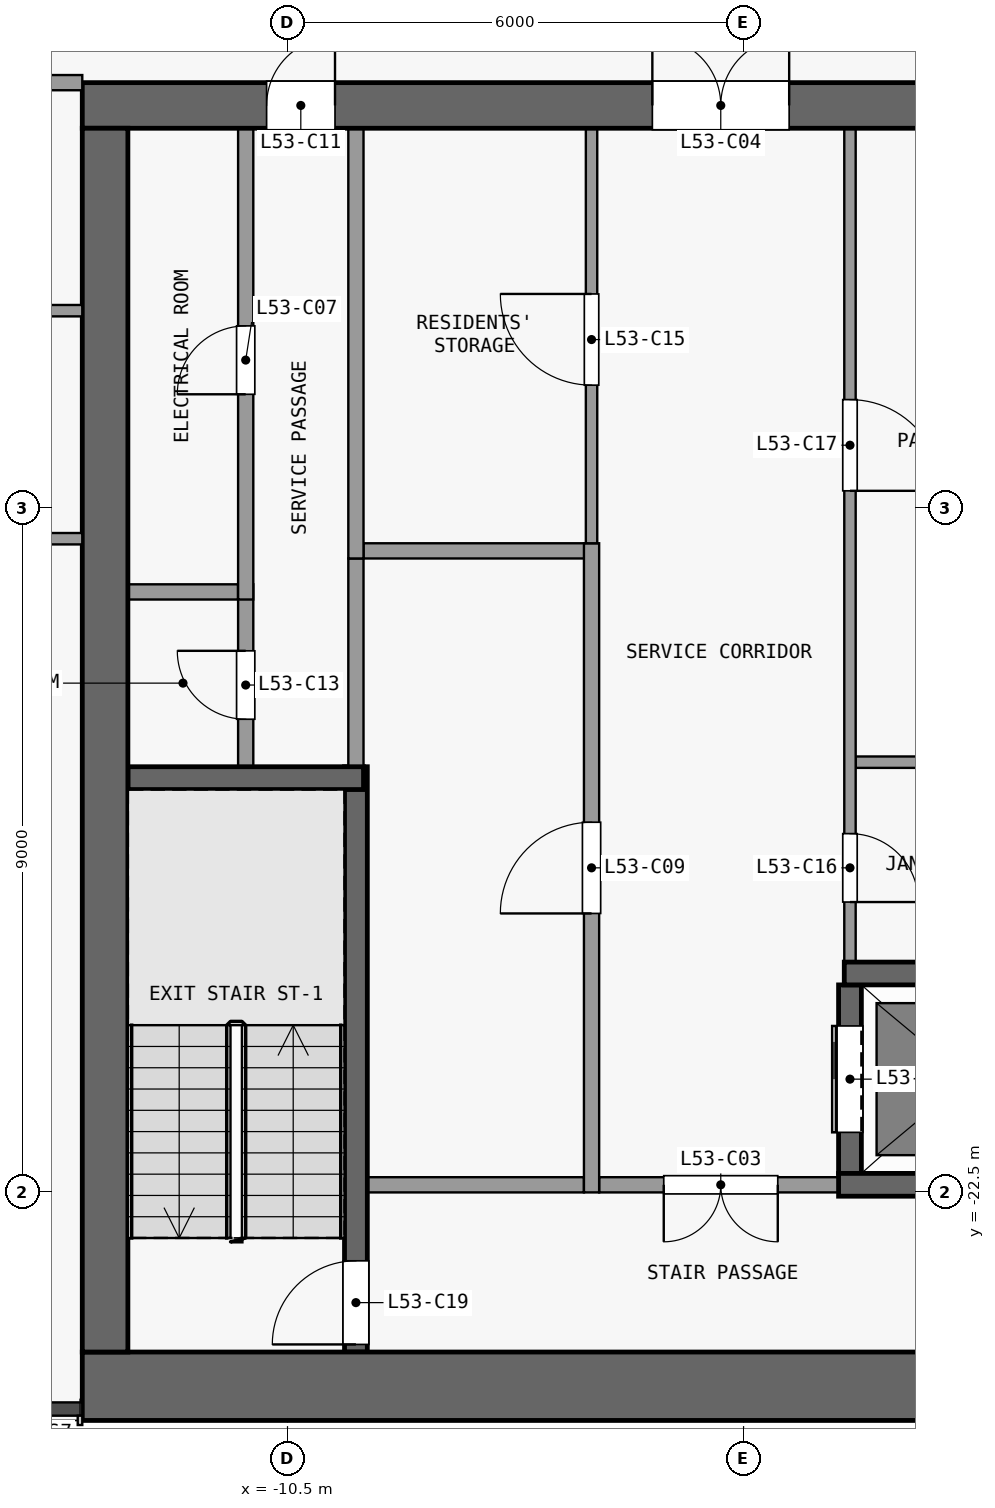
"""IFC4 building model, lengths in metres.
Left out: names, types, materials, properties, quantities, classifications, styles, units other than length and angle.
Written with IfcOpenShell. Run it as: python <this file> out.ifc"""

import sys

from ifc_helpers import new_model, si_unit, direction, frame, frame_2d, origin, place, context, subcontext, project, spatial, rectangle, extrude, element, fill, save


model = new_model("IFC4")
c1 = context("Model", 3, precision=1e-05, world=origin(), true_north=direction((0.0, 1.0)))
c2 = subcontext(c1, "Body", "Model", "MODEL_VIEW")
j1 = project(units=[si_unit("LENGTHUNIT", "METRE"), si_unit("PLANEANGLEUNIT", "RADIAN")], contexts=[c1])
p1 = place(None, origin())
s1 = spatial("IfcSite", under=j1, at=p1, CompositionType="ELEMENT")
p2 = place(p1, origin())
s2 = spatial("IfcBuilding", under=s1, at=p2, CompositionType="ELEMENT")
p3 = place(p2, frame((0.0, 0.0, 212.3)))
s3 = spatial("IfcBuildingStorey", under=s2, at=p3, CompositionType="ELEMENT", Elevation=212.3)
p4 = place(p3, frame((-13.2, -25.05, 0.0), z_axis=(0.0, 0.0, 1.0), x_axis=(1.0, 0.0, 0.0)))
e1 = element("IfcWall", 1, at=p4, inside=s3, PredefinedType="SHEAR", context=c2, shape_type="SweptSolid", body=[
    extrude(rectangle(XDim=26.4, YDim=0.9, at=frame_2d((13.2, 0.0))), origin(), (0.0, 0.0, 1.0), 3.3),
])
p5 = place(p3, frame((-13.2, -8.2, 0.0), z_axis=(0.0, 0.0, 1.0), x_axis=(1.0, 0.0, 0.0)))
e2 = element("IfcWall", 2, at=p5, inside=s3, PredefinedType="SHEAR", context=c2, shape_type="SweptSolid", body=[
    extrude(rectangle(XDim=26.4, YDim=0.6, at=frame_2d((13.2, 0.0))), origin(), (0.0, 0.0, 1.0), 3.3),
])
p6 = place(p5, frame((7.5, 0.0, 0.0)))
e3 = element("IfcOpeningElement", 3, at=p6, cuts=e2, PredefinedType="OPENING", context=c2, shape_type="SweptSolid", body=[
    extrude(rectangle(XDim=1.8, YDim=2.1, at=frame_2d((0.9, 1.05))), frame((0.0, 0.31, 0.0), z_axis=(0.0, -1.0, 0.0), x_axis=(1.0, 0.0, 0.0)), (0.0, 0.0, 1.0), 0.62),
])
p7 = place(p5, frame((17.1, 0.0, 0.0)))
e4 = element("IfcOpeningElement", 4, at=p7, cuts=e2, PredefinedType="OPENING", context=c2, shape_type="SweptSolid", body=[
    extrude(rectangle(XDim=1.8, YDim=2.1, at=frame_2d((0.9, 1.05))), frame((0.0, 0.31, 0.0), z_axis=(0.0, -1.0, 0.0), x_axis=(1.0, 0.0, 0.0)), (0.0, 0.0, 1.0), 0.62),
])
p8 = place(p5, frame((2.425, 0.0, 0.0)))
e5 = element("IfcOpeningElement", 5, at=p8, cuts=e2, PredefinedType="OPENING", context=c2, shape_type="SweptSolid", body=[
    extrude(rectangle(XDim=0.9, YDim=2.1, at=frame_2d((0.45, 1.05))), frame((0.0, 0.31, 0.0), z_axis=(0.0, -1.0, 0.0), x_axis=(1.0, 0.0, 0.0)), (0.0, 0.0, 1.0), 0.62),
])
p9 = place(p5, frame((23.075, 0.0, 0.0)))
e6 = element("IfcOpeningElement", 6, at=p9, cuts=e2, PredefinedType="OPENING", context=c2, shape_type="SweptSolid", body=[
    extrude(rectangle(XDim=0.9, YDim=2.1, at=frame_2d((0.45, 1.05))), frame((0.0, 0.31, 0.0), z_axis=(0.0, -1.0, 0.0), x_axis=(1.0, 0.0, 0.0)), (0.0, 0.0, 1.0), 0.62),
])
p10 = place(p3, frame((-12.9, -24.6, 0.0), z_axis=(0.0, 0.0, 1.0), x_axis=(0.0, 1.0, 0.0)))
e7 = element("IfcWall", 7, at=p10, inside=s3, PredefinedType="SHEAR", context=c2, shape_type="SweptSolid", body=[
    extrude(rectangle(XDim=16.1, YDim=0.6, at=frame_2d((8.05, 0.0))), origin(), (0.0, 0.0, 1.0), 3.3),
])
p11 = place(p3, frame((-9.45, -22.4, 0.0), z_axis=(0.0, 0.0, 1.0), x_axis=(1.0, 0.0, 0.0)))
e8 = element("IfcWall", 8, at=p11, inside=s3, PredefinedType="PARTITIONING", context=c2, shape_type="SweptSolid", body=[
    extrude(rectangle(XDim=2.85, YDim=0.2, at=frame_2d((1.425, 0.0))), origin(), (0.0, 0.0, 1.0), 3.3),
])
p12 = place(p3, frame((-3.25, -22.4, 0.0), z_axis=(0.0, 0.0, 1.0), x_axis=(-1.0, 0.0, 0.0)))
e9 = element("IfcWall", 9, at=p12, inside=s3, PredefinedType="PARTITIONING", context=c2, shape_type="SweptSolid", body=[
    extrude(rectangle(XDim=3.15, YDim=0.2, at=frame_2d((1.575, 0.0))), origin(), (0.0, 0.0, 1.0), 3.3),
])
p13 = place(p12, frame((0.8, 0.0, 0.0)))
e10 = element("IfcOpeningElement", 10, at=p13, cuts=e9, PredefinedType="OPENING", context=c2, shape_type="SweptSolid", body=[
    extrude(rectangle(XDim=1.5, YDim=2.1, at=frame_2d((0.75, 1.05))), frame((0.0, 0.11, 0.0), z_axis=(0.0, -1.0, 0.0), x_axis=(1.0, 0.0, 0.0)), (0.0, 0.0, 1.0), 0.22),
])
p14 = place(p3, frame((-3.25, -22.4, 0.0), z_axis=(0.0, 0.0, 1.0), x_axis=(1.0, 0.0, 0.0)))
e11 = element("IfcWall", 11, at=p14, inside=s3, PredefinedType="SHEAR", context=c2, shape_type="SweptSolid", body=[
    extrude(rectangle(XDim=6.5, YDim=0.3, at=frame_2d((3.25, 0.0))), origin(), (0.0, 0.0, 1.0), 3.3),
])
p15 = place(p3, frame((-3.175, -19.62, 0.0), z_axis=(0.0, 0.0, 1.0), x_axis=(1.0, 0.0, 0.0)))
e12 = element("IfcWall", 12, at=p15, inside=s3, PredefinedType="SHEAR", context=c2, shape_type="SweptSolid", body=[
    extrude(rectangle(XDim=3.025, YDim=0.3, at=frame_2d((1.513, 0.0))), origin(), (0.0, 0.0, 1.0), 3.3),
])
p16 = place(p3, frame((-12.6, -17.05, 0.0), z_axis=(0.0, 0.0, 1.0), x_axis=(1.0, 0.0, 0.0)))
e13 = element("IfcWall", 13, at=p16, inside=s3, PredefinedType="SHEAR", context=c2, shape_type="SweptSolid", body=[
    extrude(rectangle(XDim=3.1, YDim=0.3, at=frame_2d((1.55, 0.0))), origin(), (0.0, 0.0, 1.0), 3.3),
])
p17 = place(p3, frame((-3.025, -16.84, 0.0), z_axis=(0.0, 0.0, 1.0), x_axis=(1.0, 0.0, 0.0)))
e14 = element("IfcWall", 14, at=p17, inside=s3, PredefinedType="PARTITIONING", context=c2, shape_type="SweptSolid", body=[
    extrude(rectangle(XDim=2.925, YDim=0.15, at=frame_2d((1.462, 0.0))), origin(), (0.0, 0.0, 1.0), 3.3),
])
p18 = place(p3, frame((-12.6, -14.6, 0.0), z_axis=(0.0, 0.0, 1.0), x_axis=(1.0, 0.0, 0.0)))
e15 = element("IfcWall", 15, at=p18, inside=s3, PredefinedType="PARTITIONING", context=c2, shape_type="SweptSolid", body=[
    extrude(rectangle(XDim=1.45, YDim=0.2, at=frame_2d((0.725, 0.0))), origin(), (0.0, 0.0, 1.0), 3.3),
])
p19 = place(p3, frame((-9.5, -14.06, 0.0), z_axis=(0.0, 0.0, 1.0), x_axis=(1.0, 0.0, 0.0)))
e16 = element("IfcWall", 16, at=p19, inside=s3, PredefinedType="PARTITIONING", context=c2, shape_type="SweptSolid", body=[
    extrude(rectangle(XDim=3.075, YDim=0.2, at=frame_2d((1.538, 0.0))), origin(), (0.0, 0.0, 1.0), 3.3),
])
p20 = place(p3, frame((-11.05, -16.9, 0.0), z_axis=(0.0, 0.0, 1.0), x_axis=(0.0, 1.0, 0.0)))
e17 = element("IfcWall", 17, at=p20, inside=s3, PredefinedType="PARTITIONING", context=c2, shape_type="SweptSolid", body=[
    extrude(rectangle(XDim=2.4, YDim=0.2, at=frame_2d((1.2, 0.0))), origin(), (0.0, 0.0, 1.0), 3.3),
])
p21 = place(p20, frame((0.625, 0.0, 0.0)))
e18 = element("IfcOpeningElement", 18, at=p21, cuts=e17, PredefinedType="OPENING", context=c2, shape_type="SweptSolid", body=[
    extrude(rectangle(XDim=0.9, YDim=2.1, at=frame_2d((0.45, 1.05))), frame((0.0, 0.11, 0.0), z_axis=(0.0, -1.0, 0.0), x_axis=(1.0, 0.0, 0.0)), (0.0, 0.0, 1.0), 0.22),
])
p22 = place(p3, frame((-11.05, -14.7, 0.0), z_axis=(0.0, 0.0, 1.0), x_axis=(0.0, 1.0, 0.0)))
e19 = element("IfcWall", 19, at=p22, inside=s3, PredefinedType="PARTITIONING", context=c2, shape_type="SweptSolid", body=[
    extrude(rectangle(XDim=6.2, YDim=0.2, at=frame_2d((3.1, 0.0))), origin(), (0.0, 0.0, 1.0), 3.3),
])
p23 = place(p22, frame((2.7, 0.0, 0.0)))
e20 = element("IfcOpeningElement", 20, at=p23, cuts=e19, PredefinedType="OPENING", context=c2, shape_type="SweptSolid", body=[
    extrude(rectangle(XDim=0.9, YDim=2.1, at=frame_2d((0.45, 1.05))), frame((0.0, 0.11, 0.0), z_axis=(0.0, -1.0, 0.0), x_axis=(1.0, 0.0, 0.0)), (0.0, 0.0, 1.0), 0.22),
])
p24 = place(p3, frame((-9.6, -24.6, 0.0), z_axis=(0.0, 0.0, 1.0), x_axis=(0.0, 1.0, 0.0)))
e21 = element("IfcWall", 21, at=p24, inside=s3, PredefinedType="SHEAR", context=c2, shape_type="SweptSolid", body=[
    extrude(rectangle(XDim=7.7, YDim=0.3, at=frame_2d((3.85, 0.0))), origin(), (0.0, 0.0, 1.0), 3.3),
])
p25 = place(p24, frame((0.1, 0.0, 0.0)))
e22 = element("IfcOpeningElement", 22, at=p25, cuts=e21, PredefinedType="OPENING", context=c2, shape_type="SweptSolid", body=[
    extrude(rectangle(XDim=1.1, YDim=2.1, at=frame_2d((0.55, 1.05))), frame((0.0, 0.16, 0.0), z_axis=(0.0, -1.0, 0.0), x_axis=(1.0, 0.0, 0.0)), (0.0, 0.0, 1.0), 0.32),
])
p26 = place(p3, frame((-9.6, -16.9, 0.0), z_axis=(0.0, 0.0, 1.0), x_axis=(0.0, 1.0, 0.0)))
e23 = element("IfcWall", 23, at=p26, inside=s3, PredefinedType="PARTITIONING", context=c2, shape_type="SweptSolid", body=[
    extrude(rectangle(XDim=2.74, YDim=0.2, at=frame_2d((1.37, 0.0))), origin(), (0.0, 0.0, 1.0), 3.3),
])
p27 = place(p3, frame((-9.6, -14.16, 0.0), z_axis=(0.0, 0.0, 1.0), x_axis=(0.0, 1.0, 0.0)))
e24 = element("IfcWall", 24, at=p27, inside=s3, PredefinedType="PARTITIONING", context=c2, shape_type="SweptSolid", body=[
    extrude(rectangle(XDim=5.66, YDim=0.2, at=frame_2d((2.83, 0.0))), origin(), (0.0, 0.0, 1.0), 3.3),
])
p28 = place(p3, frame((-6.5, -22.5, 0.0), z_axis=(0.0, 0.0, 1.0), x_axis=(0.0, 1.0, 0.0)))
e25 = element("IfcWall", 25, at=p28, inside=s3, PredefinedType="PARTITIONING", context=c2, shape_type="SweptSolid", body=[
    extrude(rectangle(XDim=8.54, YDim=0.2, at=frame_2d((4.27, 0.0))), origin(), (0.0, 0.0, 1.0), 3.3),
])
p29 = place(p28, frame((3.67, 0.0, 0.0)))
e26 = element("IfcOpeningElement", 26, at=p29, cuts=e25, PredefinedType="OPENING", context=c2, shape_type="SweptSolid", body=[
    extrude(rectangle(XDim=1.2, YDim=2.1, at=frame_2d((0.6, 1.05))), frame((0.0, 0.11, 0.0), z_axis=(0.0, -1.0, 0.0), x_axis=(1.0, 0.0, 0.0)), (0.0, 0.0, 1.0), 0.22),
])
p30 = place(p3, frame((-6.5, -13.96, 0.0), z_axis=(0.0, 0.0, 1.0), x_axis=(0.0, 1.0, 0.0)))
e27 = element("IfcWall", 27, at=p30, inside=s3, PredefinedType="PARTITIONING", context=c2, shape_type="SweptSolid", body=[
    extrude(rectangle(XDim=5.46, YDim=0.15, at=frame_2d((2.73, 0.0))), origin(), (0.0, 0.0, 1.0), 3.3),
])
p31 = place(p30, frame((2.08, 0.0, 0.0)))
e28 = element("IfcOpeningElement", 28, at=p31, cuts=e27, PredefinedType="OPENING", context=c2, shape_type="SweptSolid", body=[
    extrude(rectangle(XDim=1.2, YDim=2.1, at=frame_2d((0.6, 1.05))), frame((0.0, 0.085, 0.0), z_axis=(0.0, -1.0, 0.0), x_axis=(1.0, 0.0, 0.0)), (0.0, 0.0, 1.0), 0.17),
])
p32 = place(p3, frame((-3.1, -22.25, 0.0), z_axis=(0.0, 0.0, 1.0), x_axis=(0.0, 1.0, 0.0)))
e29 = element("IfcWall", 29, at=p32, inside=s3, PredefinedType="SHEAR", context=c2, shape_type="SweptSolid", body=[
    extrude(rectangle(XDim=2.48, YDim=0.3, at=frame_2d((1.24, 0.0))), origin(), (0.0, 0.0, 1.0), 3.3),
])
p33 = place(p32, frame((0.54, 0.0, 0.0)))
e30 = element("IfcOpeningElement", 30, at=p33, cuts=e29, PredefinedType="OPENING", context=c2, shape_type="SweptSolid", body=[
    extrude(rectangle(XDim=1.4, YDim=2.1, at=frame_2d((0.7, 1.05))), frame((0.0, 0.16, 0.0), z_axis=(0.0, -1.0, 0.0), x_axis=(1.0, 0.0, 0.0)), (0.0, 0.0, 1.0), 0.32),
])
p34 = place(p3, frame((-3.1, -8.5, 0.0), z_axis=(0.0, 0.0, 1.0), x_axis=(0.0, -1.0, 0.0)))
e31 = element("IfcWall", 31, at=p34, inside=s3, PredefinedType="PARTITIONING", context=c2, shape_type="SweptSolid", body=[
    extrude(rectangle(XDim=10.97, YDim=0.15, at=frame_2d((5.485, 0.0))), origin(), (0.0, 0.0, 1.0), 3.3),
])
p35 = place(p34, frame((9.28, 0.0, 0.0)))
e32 = element("IfcOpeningElement", 32, at=p35, cuts=e31, PredefinedType="OPENING", context=c2, shape_type="SweptSolid", body=[
    extrude(rectangle(XDim=0.9, YDim=2.1, at=frame_2d((0.45, 1.05))), frame((0.0, 0.085, 0.0), z_axis=(0.0, -1.0, 0.0), x_axis=(1.0, 0.0, 0.0)), (0.0, 0.0, 1.0), 0.17),
])
p36 = place(p34, frame((3.57, 0.0, 0.0)))
e33 = element("IfcOpeningElement", 33, at=p36, cuts=e31, PredefinedType="OPENING", context=c2, shape_type="SweptSolid", body=[
    extrude(rectangle(XDim=1.2, YDim=2.1, at=frame_2d((0.6, 1.05))), frame((0.0, 0.085, 0.0), z_axis=(0.0, -1.0, 0.0), x_axis=(1.0, 0.0, 0.0)), (0.0, 0.0, 1.0), 0.17),
])
p37 = place(p3, frame((-19.262, -13.9, 0.0), z_axis=(0.0, 0.0, 1.0), x_axis=(1.0, 0.0, 0.0)))
e34 = element("IfcWall", 34, at=p37, inside=s3, PredefinedType="PARTITIONING", context=c2, shape_type="SweptSolid", body=[
    extrude(rectangle(XDim=6.062, YDim=0.15, at=frame_2d((3.031, 0.0))), origin(), (0.0, 0.0, 1.0), 3.3),
])
p38 = place(p37, frame((0.712, 0.0, 0.0)))
e35 = element("IfcOpeningElement", 35, at=p38, cuts=e34, PredefinedType="OPENING", context=c2, shape_type="SweptSolid", body=[
    extrude(rectangle(XDim=0.9, YDim=2.1, at=frame_2d((0.45, 1.05))), frame((0.0, 0.085, 0.0), z_axis=(0.0, -1.0, 0.0), x_axis=(1.0, 0.0, 0.0)), (0.0, 0.0, 1.0), 0.17),
])
p39 = place(p3, frame((-19.262, -10.9, 0.0), z_axis=(0.0, 0.0, 1.0), x_axis=(1.0, 0.0, 0.0)))
e36 = element("IfcWall", 36, at=p39, inside=s3, PredefinedType="PARTITIONING", context=c2, shape_type="SweptSolid", body=[
    extrude(rectangle(XDim=6.062, YDim=0.15, at=frame_2d((3.031, 0.0))), origin(), (0.0, 0.0, 1.0), 3.3),
])
p40 = place(p39, frame((1.012, 0.0, 0.0)))
e37 = element("IfcOpeningElement", 37, at=p40, cuts=e36, PredefinedType="OPENING", context=c2, shape_type="SweptSolid", body=[
    extrude(rectangle(XDim=0.9, YDim=2.1, at=frame_2d((0.45, 1.05))), frame((0.0, 0.085, 0.0), z_axis=(0.0, -1.0, 0.0), x_axis=(1.0, 0.0, 0.0)), (0.0, 0.0, 1.0), 0.17),
])
p41 = place(p39, frame((4.162, 0.0, 0.0)))
e38 = element("IfcOpeningElement", 38, at=p41, cuts=e36, PredefinedType="OPENING", context=c2, shape_type="SweptSolid", body=[
    extrude(rectangle(XDim=0.9, YDim=2.1, at=frame_2d((0.45, 1.05))), frame((0.0, 0.085, 0.0), z_axis=(0.0, -1.0, 0.0), x_axis=(1.0, 0.0, 0.0)), (0.0, 0.0, 1.0), 0.17),
])
p42 = place(p3, frame((-19.262, -7.9, 0.0), z_axis=(0.0, 0.0, 1.0), x_axis=(1.0, 0.0, 0.0)))
e39 = element("IfcWall", 39, at=p42, inside=s3, PredefinedType="PARTITIONING", context=c2, shape_type="SweptSolid", body=[
    extrude(rectangle(XDim=6.062, YDim=0.2, at=frame_2d((3.031, 0.0))), origin(), (0.0, 0.0, 1.0), 3.3),
])
p43 = place(p42, frame((2.512, 0.0, 0.0)))
e40 = element("IfcOpeningElement", 40, at=p43, cuts=e39, PredefinedType="OPENING", context=c2, shape_type="SweptSolid", body=[
    extrude(rectangle(XDim=1.0, YDim=2.1, at=frame_2d((0.5, 1.05))), frame((0.0, 0.11, 0.0), z_axis=(0.0, -1.0, 0.0), x_axis=(1.0, 0.0, 0.0)), (0.0, 0.0, 1.0), 0.22),
])
p44 = place(p33, origin())
e41 = element("IfcDoor", 41, at=p44, inside=s3, OperationType="DOUBLE_DOOR_SLIDING", PredefinedType="DOOR", context=c2, shape_type="SweptSolid", body=[
    extrude(rectangle(XDim=1.4, YDim=2.1, at=frame_2d((0.7, 1.05))), frame((0.0, 0.025, 0.0), z_axis=(0.0, -1.0, 0.0), x_axis=(1.0, 0.0, 0.0)), (0.0, 0.0, 1.0), 0.05),
])
fill(e30, e41)
p45 = place(p13, origin())
e42 = element("IfcDoor", 42, at=p45, inside=s3, OperationType="DOUBLE_DOOR_SINGLE_SWING", PredefinedType="DOOR", context=c2, shape_type="SweptSolid", body=[
    extrude(rectangle(XDim=1.5, YDim=2.1, at=frame_2d((0.75, 1.05))), frame((0.0, 0.025, 0.0), z_axis=(0.0, -1.0, 0.0), x_axis=(1.0, 0.0, 0.0)), (0.0, 0.0, 1.0), 0.05),
])
fill(e10, e42)
p46 = place(p6, origin())
e43 = element("IfcDoor", 43, at=p46, inside=s3, OperationType="DOUBLE_DOOR_SINGLE_SWING", PredefinedType="DOOR", context=c2, shape_type="SweptSolid", body=[
    extrude(rectangle(XDim=1.8, YDim=2.1, at=frame_2d((0.9, 1.05))), frame((0.0, 0.025, 0.0), z_axis=(0.0, -1.0, 0.0), x_axis=(1.0, 0.0, 0.0)), (0.0, 0.0, 1.0), 0.05),
])
fill(e3, e43)
p47 = place(p23, origin())
e44 = element("IfcDoor", 44, at=p47, inside=s3, OperationType="SINGLE_SWING_LEFT", PredefinedType="DOOR", context=c2, shape_type="SweptSolid", body=[
    extrude(rectangle(XDim=0.9, YDim=2.1, at=frame_2d((0.45, 1.05))), frame((0.0, 0.025, 0.0), z_axis=(0.0, -1.0, 0.0), x_axis=(1.0, 0.0, 0.0)), (0.0, 0.0, 1.0), 0.05),
])
fill(e20, e44)
p48 = place(p29, origin())
e45 = element("IfcDoor", 45, at=p48, inside=s3, OperationType="SINGLE_SWING_LEFT", PredefinedType="DOOR", context=c2, shape_type="SweptSolid", body=[
    extrude(rectangle(XDim=1.2, YDim=2.1, at=frame_2d((0.6, 1.05))), frame((0.0, 0.025, 0.0), z_axis=(0.0, -1.0, 0.0), x_axis=(1.0, 0.0, 0.0)), (0.0, 0.0, 1.0), 0.05),
])
fill(e26, e45)
p49 = place(p8, origin())
e46 = element("IfcDoor", 46, at=p49, inside=s3, OperationType="SINGLE_SWING_RIGHT", PredefinedType="DOOR", context=c2, shape_type="SweptSolid", body=[
    extrude(rectangle(XDim=0.9, YDim=2.1, at=frame_2d((0.45, 1.05))), frame((0.0, 0.025, 0.0), z_axis=(0.0, -1.0, 0.0), x_axis=(1.0, 0.0, 0.0)), (0.0, 0.0, 1.0), 0.05),
])
fill(e5, e46)
p50 = place(p21, origin())
e47 = element("IfcDoor", 47, at=p50, inside=s3, OperationType="SINGLE_SWING_RIGHT", PredefinedType="DOOR", context=c2, shape_type="SweptSolid", body=[
    extrude(rectangle(XDim=0.9, YDim=2.1, at=frame_2d((0.45, 1.05))), frame((0.0, 0.025, 0.0), z_axis=(0.0, -1.0, 0.0), x_axis=(1.0, 0.0, 0.0)), (0.0, 0.0, 1.0), 0.05),
])
fill(e18, e47)
p51 = place(p31, origin())
e48 = element("IfcDoor", 48, at=p51, inside=s3, OperationType="SINGLE_SWING_RIGHT", PredefinedType="DOOR", context=c2, shape_type="SweptSolid", body=[
    extrude(rectangle(XDim=1.2, YDim=2.1, at=frame_2d((0.6, 1.05))), frame((0.0, 0.025, 0.0), z_axis=(0.0, -1.0, 0.0), x_axis=(1.0, 0.0, 0.0)), (0.0, 0.0, 1.0), 0.05),
])
fill(e28, e48)
p52 = place(p35, origin())
e49 = element("IfcDoor", 49, at=p52, inside=s3, OperationType="SINGLE_SWING_RIGHT", PredefinedType="DOOR", context=c2, shape_type="SweptSolid", body=[
    extrude(rectangle(XDim=0.9, YDim=2.1, at=frame_2d((0.45, 1.05))), frame((0.0, 0.025, 0.0), z_axis=(0.0, -1.0, 0.0), x_axis=(1.0, 0.0, 0.0)), (0.0, 0.0, 1.0), 0.05),
])
fill(e32, e49)
p53 = place(p36, origin())
e50 = element("IfcDoor", 50, at=p53, inside=s3, OperationType="SINGLE_SWING_RIGHT", PredefinedType="DOOR", context=c2, shape_type="SweptSolid", body=[
    extrude(rectangle(XDim=1.2, YDim=2.1, at=frame_2d((0.6, 1.05))), frame((0.0, 0.025, 0.0), z_axis=(0.0, -1.0, 0.0), x_axis=(1.0, 0.0, 0.0)), (0.0, 0.0, 1.0), 0.05),
])
fill(e33, e50)
p54 = place(p25, origin())
e51 = element("IfcDoor", 51, at=p54, inside=s3, OperationType="SINGLE_SWING_LEFT", PredefinedType="DOOR", context=c2, shape_type="SweptSolid", body=[
    extrude(rectangle(XDim=1.1, YDim=2.1, at=frame_2d((0.55, 1.05))), frame((0.0, 0.025, 0.0), z_axis=(0.0, -1.0, 0.0), x_axis=(1.0, 0.0, 0.0)), (0.0, 0.0, 1.0), 0.05),
])
fill(e22, e51)
save(model, sys.argv[1])
